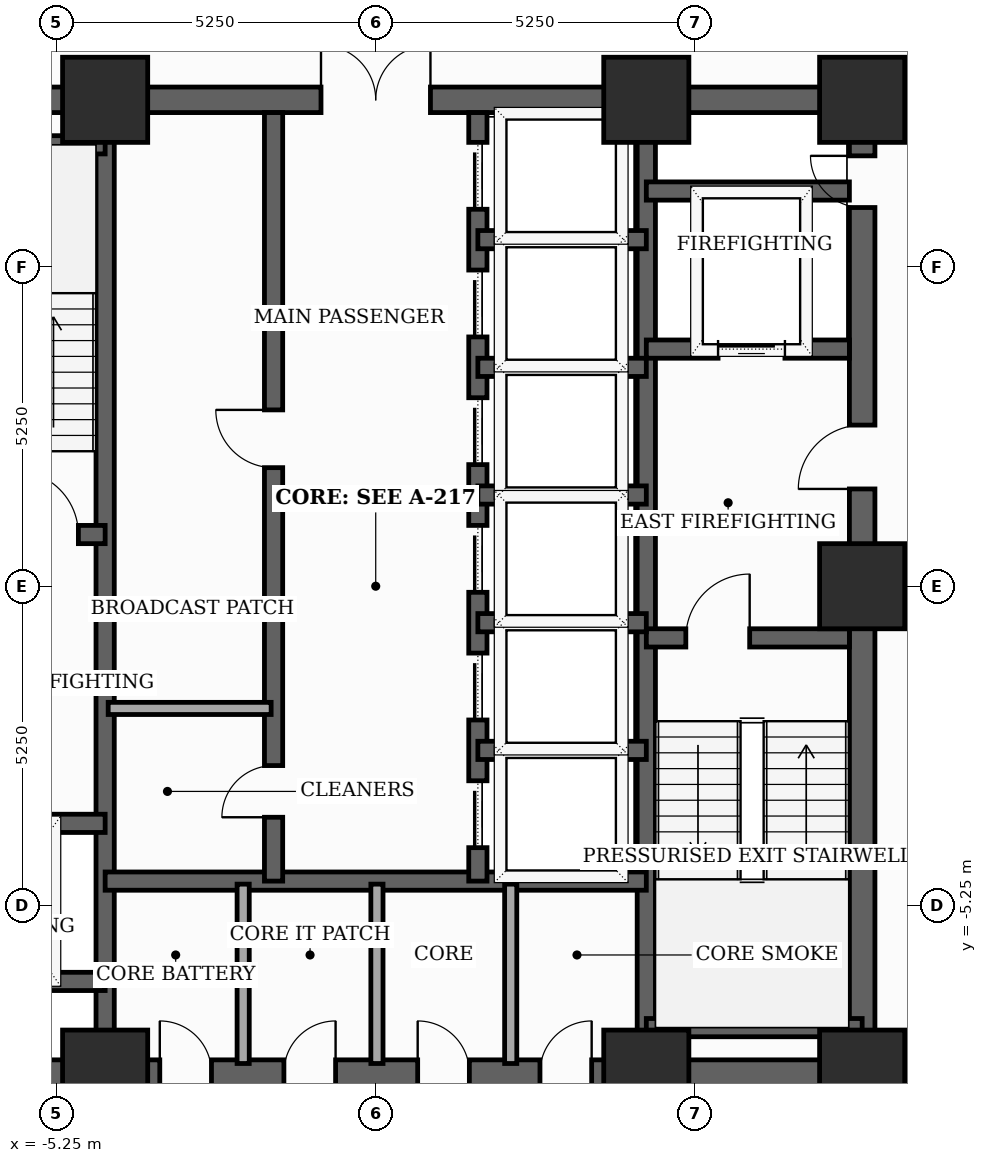
"""IFC4 building model, lengths in metres.
Left out: names, types, materials, properties, quantities, classifications, styles, units other than length and angle.
Written with IfcOpenShell. Run it as: python <this file> out.ifc"""

import sys

from ifc_helpers import new_model, si_unit, direction, frame, frame_2d, origin, origin_2d, place, context, subcontext, project, spatial, rectangle, extrude, element, fill, save


model = new_model("IFC4")
c1 = context("Model", 3, precision=1e-05, world=origin(), true_north=direction((0.0, 1.0)))
c2 = subcontext(c1, "Body", "Model", "MODEL_VIEW")
j1 = project(units=[si_unit("LENGTHUNIT", "METRE"), si_unit("PLANEANGLEUNIT", "RADIAN")], contexts=[c1])
p1 = place(None, origin())
s1 = spatial("IfcSite", under=j1, at=p1, CompositionType="ELEMENT")
p2 = place(p1, origin())
s2 = spatial("IfcBuilding", under=s1, at=p2, CompositionType="ELEMENT")
p3 = place(p2, frame((0.0, 0.0, 145.8)))
s3 = spatial("IfcBuildingStorey", under=s2, at=p3, CompositionType="ELEMENT", Elevation=145.8)
for number, where, z_axis, x_axis in (
    (1, (-4.45, -8.0, 0.0), (0.0, 0.0, 1.0), (1.0, 0.0, 0.0)),
    (2, (4.45, -8.0, 0.0), (0.0, 0.0, 1.0), (1.0, 0.0, 0.0)),
    (3, (8.0, -8.0, 0.0), (0.0, 0.0, 1.0), (1.0, 0.0, 0.0)),
    (4, (8.0, 0.0, 0.0), (0.0, 0.0, 1.0), (1.0, 0.0, 0.0)),
    (5, (8.0, 8.0, 0.0), (0.0, 0.0, 1.0), (1.0, 0.0, 0.0)),
    (6, (4.45, 8.0, 0.0), (0.0, 0.0, 1.0), (1.0, 0.0, 0.0)),
    (7, (-4.45, 8.0, 0.0), (0.0, 0.0, 1.0), (1.0, 0.0, 0.0)),
):
    element("IfcColumn", number, at=place(p3, frame(where, z_axis=z_axis, x_axis=x_axis)), inside=s3, PredefinedType="COLUMN", context=c2, shape_type="SweptSolid", body=[
        extrude(rectangle(XDim=1.4, YDim=1.4, at=origin_2d()), origin(), (0.0, 0.0, 1.0), 3.7),
    ])
p4 = place(p3, frame((8.0, -8.0, 0.0), z_axis=(0.0, 0.0, 1.0), x_axis=(0.0, 1.0, 0.0)))
e8 = element("IfcWall", 8, at=p4, inside=s3, PredefinedType="SHEAR", context=c2, shape_type="SweptSolid", body=[
    extrude(rectangle(XDim=16.0, YDim=0.42, at=frame_2d((8.0, 0.0))), origin(), (0.0, 0.0, 1.0), 3.46),
])
p5 = place(p4, frame((9.6, 0.0, 0.0)))
e9 = element("IfcOpeningElement", 9, at=p5, cuts=e8, PredefinedType="OPENING", context=c2, shape_type="SweptSolid", body=[
    extrude(rectangle(XDim=1.05, YDim=2.15, at=frame_2d((0.525, 1.075))), frame((0.0, 0.22, 0.0), z_axis=(0.0, -1.0, 0.0), x_axis=(1.0, 0.0, 0.0)), (0.0, 0.0, 1.0), 0.44),
])
p6 = place(p4, frame((14.229, 0.0, 0.0)))
e10 = element("IfcOpeningElement", 10, at=p6, cuts=e8, PredefinedType="OPENING", context=c2, shape_type="SweptSolid", body=[
    extrude(rectangle(XDim=0.85, YDim=2.02, at=frame_2d((0.425, 1.01))), frame((0.0, 0.22, 0.0), z_axis=(0.0, -1.0, 0.0), x_axis=(1.0, 0.0, 0.0)), (0.0, 0.0, 1.0), 0.44),
])
p7 = place(p3, frame((-8.0, -8.0, 0.0), z_axis=(0.0, 0.0, 1.0), x_axis=(1.0, 0.0, 0.0)))
e11 = element("IfcWall", 11, at=p7, inside=s3, PredefinedType="SHEAR", context=c2, shape_type="SweptSolid", body=[
    extrude(rectangle(XDim=16.0, YDim=0.42, at=frame_2d((8.0, 0.0))), origin(), (0.0, 0.0, 1.0), 3.46),
])
p8 = place(p7, frame((4.449, 0.0, 0.0)))
e12 = element("IfcOpeningElement", 12, at=p8, cuts=e11, PredefinedType="OPENING", context=c2, shape_type="SweptSolid", body=[
    extrude(rectangle(XDim=0.85, YDim=2.02, at=frame_2d((0.425, 1.01))), frame((0.0, 0.22, 0.0), z_axis=(0.0, -1.0, 0.0), x_axis=(1.0, 0.0, 0.0)), (0.0, 0.0, 1.0), 0.44),
])
p9 = place(p7, frame((6.49, 0.0, 0.0)))
e13 = element("IfcOpeningElement", 13, at=p9, cuts=e11, PredefinedType="OPENING", context=c2, shape_type="SweptSolid", body=[
    extrude(rectangle(XDim=0.85, YDim=2.02, at=frame_2d((0.425, 1.01))), frame((0.0, 0.22, 0.0), z_axis=(0.0, -1.0, 0.0), x_axis=(1.0, 0.0, 0.0)), (0.0, 0.0, 1.0), 0.44),
])
p10 = place(p7, frame((8.69, 0.0, 0.0)))
e14 = element("IfcOpeningElement", 14, at=p10, cuts=e11, PredefinedType="OPENING", context=c2, shape_type="SweptSolid", body=[
    extrude(rectangle(XDim=0.85, YDim=2.02, at=frame_2d((0.425, 1.01))), frame((0.0, 0.22, 0.0), z_axis=(0.0, -1.0, 0.0), x_axis=(1.0, 0.0, 0.0)), (0.0, 0.0, 1.0), 0.44),
])
p11 = place(p7, frame((10.701, 0.0, 0.0)))
e15 = element("IfcOpeningElement", 15, at=p11, cuts=e11, PredefinedType="OPENING", context=c2, shape_type="SweptSolid", body=[
    extrude(rectangle(XDim=0.85, YDim=2.02, at=frame_2d((0.425, 1.01))), frame((0.0, 0.22, 0.0), z_axis=(0.0, -1.0, 0.0), x_axis=(1.0, 0.0, 0.0)), (0.0, 0.0, 1.0), 0.44),
])
p12 = place(p3, frame((-8.0, 8.0, 0.0), z_axis=(0.0, 0.0, 1.0), x_axis=(1.0, 0.0, 0.0)))
e16 = element("IfcWall", 16, at=p12, inside=s3, PredefinedType="SHEAR", context=c2, shape_type="SweptSolid", body=[
    extrude(rectangle(XDim=16.0, YDim=0.42, at=frame_2d((8.0, 0.0))), origin(), (0.0, 0.0, 1.0), 3.46),
])
p13 = place(p12, frame((7.1, 0.0, 0.0)))
e17 = element("IfcOpeningElement", 17, at=p13, cuts=e16, PredefinedType="OPENING", context=c2, shape_type="SweptSolid", body=[
    extrude(rectangle(XDim=1.8, YDim=2.15, at=frame_2d((0.9, 1.075))), frame((0.0, 0.22, 0.0), z_axis=(0.0, -1.0, 0.0), x_axis=(1.0, 0.0, 0.0)), (0.0, 0.0, 1.0), 0.44),
])
for number, where, z_axis, x_axis in (
    (18, (-4.45, -7.79, 0.0), (0.0, 0.0, 1.0), (0.0, 1.0, 0.0)),
    (19, (4.45, -7.79, 0.0), (0.0, 0.0, 1.0), (0.0, 1.0, 0.0)),
):
    element("IfcWall", number, at=place(p3, frame(where, z_axis=z_axis, x_axis=x_axis)), inside=s3, PredefinedType="SHEAR", context=c2, shape_type="SweptSolid", body=[
        extrude(rectangle(XDim=15.58, YDim=0.3, at=frame_2d((7.79, 0.0))), origin(), (0.0, 0.0, 1.0), 3.46),
    ])
p14 = place(p3, frame((-7.79, 0.85, 0.0), z_axis=(0.0, 0.0, 1.0), x_axis=(1.0, 0.0, 0.0)))
e20 = element("IfcWall", 20, at=p14, inside=s3, PredefinedType="SHEAR", context=c2, shape_type="SweptSolid", body=[
    extrude(rectangle(XDim=3.34, YDim=0.3, at=frame_2d((1.67, 0.0))), origin(), (0.0, 0.0, 1.0), 3.46),
])
p15 = place(p14, frame((1.85, 0.0, 0.0)))
e21 = element("IfcOpeningElement", 21, at=p15, cuts=e20, PredefinedType="OPENING", context=c2, shape_type="SweptSolid", body=[
    extrude(rectangle(XDim=1.05, YDim=2.15, at=frame_2d((0.525, 1.075))), frame((0.0, 0.16, 0.0), z_axis=(0.0, -1.0, 0.0), x_axis=(1.0, 0.0, 0.0)), (0.0, 0.0, 1.0), 0.32),
])
p16 = place(p3, frame((-7.79, 7.26, 0.0), z_axis=(0.0, 0.0, 1.0), x_axis=(1.0, 0.0, 0.0)))
e22 = element("IfcWall", 22, at=p16, inside=s3, PredefinedType="SHEAR", context=c2, shape_type="SweptSolid", body=[
    extrude(rectangle(XDim=3.34, YDim=0.3, at=frame_2d((1.67, 0.0))), origin(), (0.0, 0.0, 1.0), 3.46),
])
p17 = place(p3, frame((4.45, -0.85, 0.0), z_axis=(0.0, 0.0, 1.0), x_axis=(1.0, 0.0, 0.0)))
e23 = element("IfcWall", 23, at=p17, inside=s3, PredefinedType="SHEAR", context=c2, shape_type="SweptSolid", body=[
    extrude(rectangle(XDim=3.34, YDim=0.3, at=frame_2d((1.67, 0.0))), origin(), (0.0, 0.0, 1.0), 3.46),
])
p18 = place(p17, frame((0.65, 0.0, 0.0)))
e24 = element("IfcOpeningElement", 24, at=p18, cuts=e23, PredefinedType="OPENING", context=c2, shape_type="SweptSolid", body=[
    extrude(rectangle(XDim=1.05, YDim=2.15, at=frame_2d((0.525, 1.075))), frame((0.0, 0.16, 0.0), z_axis=(0.0, -1.0, 0.0), x_axis=(1.0, 0.0, 0.0)), (0.0, 0.0, 1.0), 0.32),
])
p19 = place(p3, frame((4.45, -7.26, 0.0), z_axis=(0.0, 0.0, 1.0), x_axis=(1.0, 0.0, 0.0)))
e25 = element("IfcWall", 25, at=p19, inside=s3, PredefinedType="SHEAR", context=c2, shape_type="SweptSolid", body=[
    extrude(rectangle(XDim=3.55, YDim=0.3, at=frame_2d((1.775, 0.0))), origin(), (0.0, 0.0, 1.0), 3.46),
])
p20 = place(p3, frame((-7.79, -3.9, 0.0), z_axis=(0.0, 0.0, 1.0), x_axis=(1.0, 0.0, 0.0)))
e26 = element("IfcWall", 26, at=p20, inside=s3, PredefinedType="SHEAR", context=c2, shape_type="SweptSolid", body=[
    extrude(rectangle(XDim=3.34, YDim=0.3, at=frame_2d((1.67, 0.0))), origin(), (0.0, 0.0, 1.0), 3.46),
])
p21 = place(p20, frame((1.27, 0.0, 0.0)))
e27 = element("IfcOpeningElement", 27, at=p21, cuts=e26, PredefinedType="OPENING", context=c2, shape_type="SweptSolid", body=[
    extrude(rectangle(XDim=1.1, YDim=2.1, at=frame_2d((0.55, 1.05))), frame((0.0, 0.16, 0.0), z_axis=(0.0, -1.0, 0.0), x_axis=(1.0, 0.0, 0.0)), (0.0, 0.0, 1.0), 0.32),
])
p22 = place(p3, frame((-7.79, -6.5, 0.0), z_axis=(0.0, 0.0, 1.0), x_axis=(1.0, 0.0, 0.0)))
e28 = element("IfcWall", 28, at=p22, inside=s3, PredefinedType="SHEAR", context=c2, shape_type="SweptSolid", body=[
    extrude(rectangle(XDim=3.34, YDim=0.3, at=frame_2d((1.67, 0.0))), origin(), (0.0, 0.0, 1.0), 3.46),
])
p23 = place(p3, frame((4.45, 3.9, 0.0), z_axis=(0.0, 0.0, 1.0), x_axis=(1.0, 0.0, 0.0)))
e29 = element("IfcWall", 29, at=p23, inside=s3, PredefinedType="SHEAR", context=c2, shape_type="SweptSolid", body=[
    extrude(rectangle(XDim=3.34, YDim=0.3, at=frame_2d((1.67, 0.0))), origin(), (0.0, 0.0, 1.0), 3.46),
])
p24 = place(p23, frame((1.18, 0.0, 0.0)))
e30 = element("IfcOpeningElement", 30, at=p24, cuts=e29, PredefinedType="OPENING", context=c2, shape_type="SweptSolid", body=[
    extrude(rectangle(XDim=1.1, YDim=2.1, at=frame_2d((0.55, 1.05))), frame((0.0, 0.16, 0.0), z_axis=(0.0, -1.0, 0.0), x_axis=(1.0, 0.0, 0.0)), (0.0, 0.0, 1.0), 0.32),
])
p25 = place(p3, frame((4.45, 6.5, 0.0), z_axis=(0.0, 0.0, 1.0), x_axis=(1.0, 0.0, 0.0)))
e31 = element("IfcWall", 31, at=p25, inside=s3, PredefinedType="SHEAR", context=c2, shape_type="SweptSolid", body=[
    extrude(rectangle(XDim=3.34, YDim=0.3, at=frame_2d((1.67, 0.0))), origin(), (0.0, 0.0, 1.0), 3.46),
])
p26 = place(p3, frame((-4.45, -4.85, 0.0), z_axis=(0.0, 0.0, 1.0), x_axis=(1.0, 0.0, 0.0)))
e32 = element("IfcWall", 32, at=p26, inside=s3, PredefinedType="SHEAR", context=c2, shape_type="SweptSolid", body=[
    extrude(rectangle(XDim=8.9, YDim=0.3, at=frame_2d((4.45, 0.0))), origin(), (0.0, 0.0, 1.0), 3.46),
])
p27 = place(p3, frame((-1.68, -4.85, 0.0), z_axis=(0.0, 0.0, 1.0), x_axis=(0.0, 1.0, 0.0)))
e33 = element("IfcWall", 33, at=p27, inside=s3, PredefinedType="SHEAR", context=c2, shape_type="SweptSolid", body=[
    extrude(rectangle(XDim=12.64, YDim=0.3, at=frame_2d((6.32, 0.0))), origin(), (0.0, 0.0, 1.0), 3.46),
])
p28 = place(p27, frame((1.05, 0.0, 0.0)))
e34 = element("IfcOpeningElement", 34, at=p28, cuts=e33, PredefinedType="OPENING", context=c2, shape_type="SweptSolid", body=[
    extrude(rectangle(XDim=0.85, YDim=2.02, at=frame_2d((0.425, 1.01))), frame((0.0, 0.16, 0.0), z_axis=(0.0, -1.0, 0.0), x_axis=(1.0, 0.0, 0.0)), (0.0, 0.0, 1.0), 0.32),
])
p29 = place(p27, frame((6.8, 0.0, 0.0)))
e35 = element("IfcOpeningElement", 35, at=p29, cuts=e33, PredefinedType="OPENING", context=c2, shape_type="SweptSolid", body=[
    extrude(rectangle(XDim=0.95, YDim=2.1, at=frame_2d((0.475, 1.05))), frame((0.0, 0.16, 0.0), z_axis=(0.0, -1.0, 0.0), x_axis=(1.0, 0.0, 0.0)), (0.0, 0.0, 1.0), 0.32),
])
p30 = place(p3, frame((1.68, -4.85, 0.0), z_axis=(0.0, 0.0, 1.0), x_axis=(0.0, 1.0, 0.0)))
e36 = element("IfcWall", 36, at=p30, inside=s3, PredefinedType="SHEAR", context=c2, shape_type="SweptSolid", body=[
    extrude(rectangle(XDim=12.64, YDim=0.3, at=frame_2d((6.32, 0.0))), origin(), (0.0, 0.0, 1.0), 3.46),
])
p31 = place(p30, frame((0.55, 0.0, 0.0)))
e37 = element("IfcOpeningElement", 37, at=p31, cuts=e36, PredefinedType="OPENING", context=c2, shape_type="SweptSolid", body=[
    extrude(rectangle(XDim=1.1, YDim=2.1, at=frame_2d((0.55, 1.05))), frame((0.0, 0.16, 0.0), z_axis=(0.0, -1.0, 0.0), x_axis=(1.0, 0.0, 0.0)), (0.0, 0.0, 1.0), 0.32),
])
p32 = place(p30, frame((2.65, 0.0, 0.0)))
e38 = element("IfcOpeningElement", 38, at=p32, cuts=e36, PredefinedType="OPENING", context=c2, shape_type="SweptSolid", body=[
    extrude(rectangle(XDim=1.1, YDim=2.1, at=frame_2d((0.55, 1.05))), frame((0.0, 0.16, 0.0), z_axis=(0.0, -1.0, 0.0), x_axis=(1.0, 0.0, 0.0)), (0.0, 0.0, 1.0), 0.32),
])
p33 = place(p30, frame((4.75, 0.0, 0.0)))
e39 = element("IfcOpeningElement", 39, at=p33, cuts=e36, PredefinedType="OPENING", context=c2, shape_type="SweptSolid", body=[
    extrude(rectangle(XDim=1.1, YDim=2.1, at=frame_2d((0.55, 1.05))), frame((0.0, 0.16, 0.0), z_axis=(0.0, -1.0, 0.0), x_axis=(1.0, 0.0, 0.0)), (0.0, 0.0, 1.0), 0.32),
])
p34 = place(p30, frame((6.85, 0.0, 0.0)))
e40 = element("IfcOpeningElement", 40, at=p34, cuts=e36, PredefinedType="OPENING", context=c2, shape_type="SweptSolid", body=[
    extrude(rectangle(XDim=1.1, YDim=2.1, at=frame_2d((0.55, 1.05))), frame((0.0, 0.16, 0.0), z_axis=(0.0, -1.0, 0.0), x_axis=(1.0, 0.0, 0.0)), (0.0, 0.0, 1.0), 0.32),
])
p35 = place(p30, frame((8.95, 0.0, 0.0)))
e41 = element("IfcOpeningElement", 41, at=p35, cuts=e36, PredefinedType="OPENING", context=c2, shape_type="SweptSolid", body=[
    extrude(rectangle(XDim=1.1, YDim=2.1, at=frame_2d((0.55, 1.05))), frame((0.0, 0.16, 0.0), z_axis=(0.0, -1.0, 0.0), x_axis=(1.0, 0.0, 0.0)), (0.0, 0.0, 1.0), 0.32),
])
p36 = place(p30, frame((11.05, 0.0, 0.0)))
e42 = element("IfcOpeningElement", 42, at=p36, cuts=e36, PredefinedType="OPENING", context=c2, shape_type="SweptSolid", body=[
    extrude(rectangle(XDim=1.1, YDim=2.1, at=frame_2d((0.55, 1.05))), frame((0.0, 0.16, 0.0), z_axis=(0.0, -1.0, 0.0), x_axis=(1.0, 0.0, 0.0)), (0.0, 0.0, 1.0), 0.32),
])
for number, where, z_axis, x_axis in (
    (43, (1.68, 1.5, 0.0), (0.0, 0.0, 1.0), (1.0, 0.0, 0.0)),
    (44, (1.68, 3.6, 0.0), (0.0, 0.0, 1.0), (1.0, 0.0, 0.0)),
    (45, (1.68, 5.7, 0.0), (0.0, 0.0, 1.0), (1.0, 0.0, 0.0)),
    (46, (1.68, -2.7, 0.0), (0.0, 0.0, 1.0), (1.0, 0.0, 0.0)),
    (47, (1.68, -0.6, 0.0), (0.0, 0.0, 1.0), (1.0, 0.0, 0.0)),
):
    element("IfcWall", number, at=place(p3, frame(where, z_axis=z_axis, x_axis=x_axis)), inside=s3, PredefinedType="SHEAR", context=c2, shape_type="SweptSolid", body=[
        extrude(rectangle(XDim=2.77, YDim=0.3, at=frame_2d((1.385, 0.0))), origin(), (0.0, 0.0, 1.0), 3.46),
    ])
for number, where, z_axis, x_axis in (
    (48, (-2.18, -7.85, 0.0), (0.0, 0.0, 1.0), (0.0, 1.0, 0.0)),
    (49, (0.02, -7.85, 0.0), (0.0, 0.0, 1.0), (0.0, 1.0, 0.0)),
    (50, (2.22, -7.85, 0.0), (0.0, 0.0, 1.0), (0.0, 1.0, 0.0)),
):
    element("IfcWall", number, at=place(p3, frame(where, z_axis=z_axis, x_axis=x_axis)), inside=s3, PredefinedType="SOLIDWALL", context=c2, shape_type="SweptSolid", body=[
        extrude(rectangle(XDim=2.95, YDim=0.2, at=frame_2d((1.475, 0.0))), origin(), (0.0, 0.0, 1.0), 2.845),
    ])
p37 = place(p3, frame((-4.4, -2.01, 0.0), z_axis=(0.0, 0.0, 1.0), x_axis=(1.0, 0.0, 0.0)))
e51 = element("IfcWall", 51, at=p37, inside=s3, PredefinedType="SOLIDWALL", context=c2, shape_type="SweptSolid", body=[
    extrude(rectangle(XDim=2.68, YDim=0.2, at=frame_2d((1.34, 0.0))), origin(), (0.0, 0.0, 1.0), 3.46),
])
p38 = place(p5, origin())
e52 = element("IfcDoor", 52, at=p38, inside=s3, OperationType="SINGLE_SWING_LEFT", PredefinedType="DOOR", context=c2, shape_type="SweptSolid", body=[
    extrude(rectangle(XDim=1.05, YDim=2.15, at=frame_2d((0.525, 1.075))), frame((0.0, 0.025, 0.0), z_axis=(0.0, -1.0, 0.0), x_axis=(1.0, 0.0, 0.0)), (0.0, 0.0, 1.0), 0.05),
])
fill(e9, e52)
p39 = place(p6, origin())
e53 = element("IfcDoor", 53, at=p39, inside=s3, OperationType="SINGLE_SWING_RIGHT", PredefinedType="TRAPDOOR", context=c2, shape_type="SweptSolid", body=[
    extrude(rectangle(XDim=0.85, YDim=2.02, at=frame_2d((0.425, 1.01))), frame((0.0, 0.025, 0.0), z_axis=(0.0, -1.0, 0.0), x_axis=(1.0, 0.0, 0.0)), (0.0, 0.0, 1.0), 0.05),
])
fill(e10, e53)
p40 = place(p8, origin())
e54 = element("IfcDoor", 54, at=p40, inside=s3, OperationType="SINGLE_SWING_LEFT", PredefinedType="TRAPDOOR", context=c2, shape_type="SweptSolid", body=[
    extrude(rectangle(XDim=0.85, YDim=2.02, at=frame_2d((0.425, 1.01))), frame((0.0, 0.025, 0.0), z_axis=(0.0, -1.0, 0.0), x_axis=(1.0, 0.0, 0.0)), (0.0, 0.0, 1.0), 0.05),
])
fill(e12, e54)
p41 = place(p9, origin())
e55 = element("IfcDoor", 55, at=p41, inside=s3, OperationType="SINGLE_SWING_RIGHT", PredefinedType="TRAPDOOR", context=c2, shape_type="SweptSolid", body=[
    extrude(rectangle(XDim=0.85, YDim=2.02, at=frame_2d((0.425, 1.01))), frame((0.0, 0.025, 0.0), z_axis=(0.0, -1.0, 0.0), x_axis=(1.0, 0.0, 0.0)), (0.0, 0.0, 1.0), 0.05),
])
fill(e13, e55)
p42 = place(p10, origin())
e56 = element("IfcDoor", 56, at=p42, inside=s3, OperationType="SINGLE_SWING_LEFT", PredefinedType="TRAPDOOR", context=c2, shape_type="SweptSolid", body=[
    extrude(rectangle(XDim=0.85, YDim=2.02, at=frame_2d((0.425, 1.01))), frame((0.0, 0.025, 0.0), z_axis=(0.0, -1.0, 0.0), x_axis=(1.0, 0.0, 0.0)), (0.0, 0.0, 1.0), 0.05),
])
fill(e14, e56)
p43 = place(p11, origin())
e57 = element("IfcDoor", 57, at=p43, inside=s3, OperationType="SINGLE_SWING_RIGHT", PredefinedType="TRAPDOOR", context=c2, shape_type="SweptSolid", body=[
    extrude(rectangle(XDim=0.85, YDim=2.02, at=frame_2d((0.425, 1.01))), frame((0.0, 0.025, 0.0), z_axis=(0.0, -1.0, 0.0), x_axis=(1.0, 0.0, 0.0)), (0.0, 0.0, 1.0), 0.05),
])
fill(e15, e57)
p44 = place(p13, origin())
e58 = element("IfcDoor", 58, at=p44, inside=s3, OperationType="DOUBLE_DOOR_SINGLE_SWING", PredefinedType="DOOR", context=c2, shape_type="SweptSolid", body=[
    extrude(rectangle(XDim=1.8, YDim=2.15, at=frame_2d((0.9, 1.075))), frame((0.0, 0.025, 0.0), z_axis=(0.0, -1.0, 0.0), x_axis=(1.0, 0.0, 0.0)), (0.0, 0.0, 1.0), 0.05),
])
fill(e17, e58)
p45 = place(p15, origin())
e59 = element("IfcDoor", 59, at=p45, inside=s3, OperationType="SINGLE_SWING_LEFT", PredefinedType="DOOR", context=c2, shape_type="SweptSolid", body=[
    extrude(rectangle(XDim=1.05, YDim=2.15, at=frame_2d((0.525, 1.075))), frame((0.0, 0.025, 0.0), z_axis=(0.0, -1.0, 0.0), x_axis=(1.0, 0.0, 0.0)), (0.0, 0.0, 1.0), 0.05),
])
fill(e21, e59)
p46 = place(p18, origin())
e60 = element("IfcDoor", 60, at=p46, inside=s3, OperationType="SINGLE_SWING_RIGHT", PredefinedType="DOOR", context=c2, shape_type="SweptSolid", body=[
    extrude(rectangle(XDim=1.05, YDim=2.15, at=frame_2d((0.525, 1.075))), frame((0.0, 0.025, 0.0), z_axis=(0.0, -1.0, 0.0), x_axis=(1.0, 0.0, 0.0)), (0.0, 0.0, 1.0), 0.05),
])
fill(e24, e60)
p47 = place(p24, origin())
e61 = element("IfcDoor", 61, at=p47, inside=s3, OperationType="SLIDING_TO_LEFT", PredefinedType="DOOR", context=c2, shape_type="SweptSolid", body=[
    extrude(rectangle(XDim=1.1, YDim=2.1, at=frame_2d((0.55, 1.05))), frame((0.0, 0.025, 0.0), z_axis=(0.0, -1.0, 0.0), x_axis=(1.0, 0.0, 0.0)), (0.0, 0.0, 1.0), 0.05),
])
fill(e30, e61)
p48 = place(p28, origin())
e62 = element("IfcDoor", 62, at=p48, inside=s3, OperationType="SINGLE_SWING_LEFT", PredefinedType="TRAPDOOR", context=c2, shape_type="SweptSolid", body=[
    extrude(rectangle(XDim=0.85, YDim=2.02, at=frame_2d((0.425, 1.01))), frame((0.0, 0.025, 0.0), z_axis=(0.0, -1.0, 0.0), x_axis=(1.0, 0.0, 0.0)), (0.0, 0.0, 1.0), 0.05),
])
fill(e34, e62)
p49 = place(p29, origin())
e63 = element("IfcDoor", 63, at=p49, inside=s3, OperationType="SINGLE_SWING_RIGHT", PredefinedType="DOOR", context=c2, shape_type="SweptSolid", body=[
    extrude(rectangle(XDim=0.95, YDim=2.1, at=frame_2d((0.475, 1.05))), frame((0.0, 0.025, 0.0), z_axis=(0.0, -1.0, 0.0), x_axis=(1.0, 0.0, 0.0)), (0.0, 0.0, 1.0), 0.05),
])
fill(e35, e63)
p50 = place(p31, origin())
e64 = element("IfcDoor", 64, at=p50, inside=s3, OperationType="SLIDING_TO_LEFT", PredefinedType="DOOR", context=c2, shape_type="SweptSolid", body=[
    extrude(rectangle(XDim=1.1, YDim=2.1, at=frame_2d((0.55, 1.05))), frame((0.0, 0.025, 0.0), z_axis=(0.0, -1.0, 0.0), x_axis=(1.0, 0.0, 0.0)), (0.0, 0.0, 1.0), 0.05),
])
fill(e37, e64)
p51 = place(p32, origin())
e65 = element("IfcDoor", 65, at=p51, inside=s3, OperationType="SLIDING_TO_LEFT", PredefinedType="DOOR", context=c2, shape_type="SweptSolid", body=[
    extrude(rectangle(XDim=1.1, YDim=2.1, at=frame_2d((0.55, 1.05))), frame((0.0, 0.025, 0.0), z_axis=(0.0, -1.0, 0.0), x_axis=(1.0, 0.0, 0.0)), (0.0, 0.0, 1.0), 0.05),
])
fill(e38, e65)
p52 = place(p33, origin())
e66 = element("IfcDoor", 66, at=p52, inside=s3, OperationType="SLIDING_TO_LEFT", PredefinedType="DOOR", context=c2, shape_type="SweptSolid", body=[
    extrude(rectangle(XDim=1.1, YDim=2.1, at=frame_2d((0.55, 1.05))), frame((0.0, 0.025, 0.0), z_axis=(0.0, -1.0, 0.0), x_axis=(1.0, 0.0, 0.0)), (0.0, 0.0, 1.0), 0.05),
])
fill(e39, e66)
p53 = place(p34, origin())
e67 = element("IfcDoor", 67, at=p53, inside=s3, OperationType="SLIDING_TO_LEFT", PredefinedType="DOOR", context=c2, shape_type="SweptSolid", body=[
    extrude(rectangle(XDim=1.1, YDim=2.1, at=frame_2d((0.55, 1.05))), frame((0.0, 0.025, 0.0), z_axis=(0.0, -1.0, 0.0), x_axis=(1.0, 0.0, 0.0)), (0.0, 0.0, 1.0), 0.05),
])
fill(e40, e67)
p54 = place(p35, origin())
e68 = element("IfcDoor", 68, at=p54, inside=s3, OperationType="SLIDING_TO_LEFT", PredefinedType="DOOR", context=c2, shape_type="SweptSolid", body=[
    extrude(rectangle(XDim=1.1, YDim=2.1, at=frame_2d((0.55, 1.05))), frame((0.0, 0.025, 0.0), z_axis=(0.0, -1.0, 0.0), x_axis=(1.0, 0.0, 0.0)), (0.0, 0.0, 1.0), 0.05),
])
fill(e41, e68)
p55 = place(p36, origin())
e69 = element("IfcDoor", 69, at=p55, inside=s3, OperationType="SLIDING_TO_LEFT", PredefinedType="DOOR", context=c2, shape_type="SweptSolid", body=[
    extrude(rectangle(XDim=1.1, YDim=2.1, at=frame_2d((0.55, 1.05))), frame((0.0, 0.025, 0.0), z_axis=(0.0, -1.0, 0.0), x_axis=(1.0, 0.0, 0.0)), (0.0, 0.0, 1.0), 0.05),
])
fill(e42, e69)
save(model, sys.argv[1])
